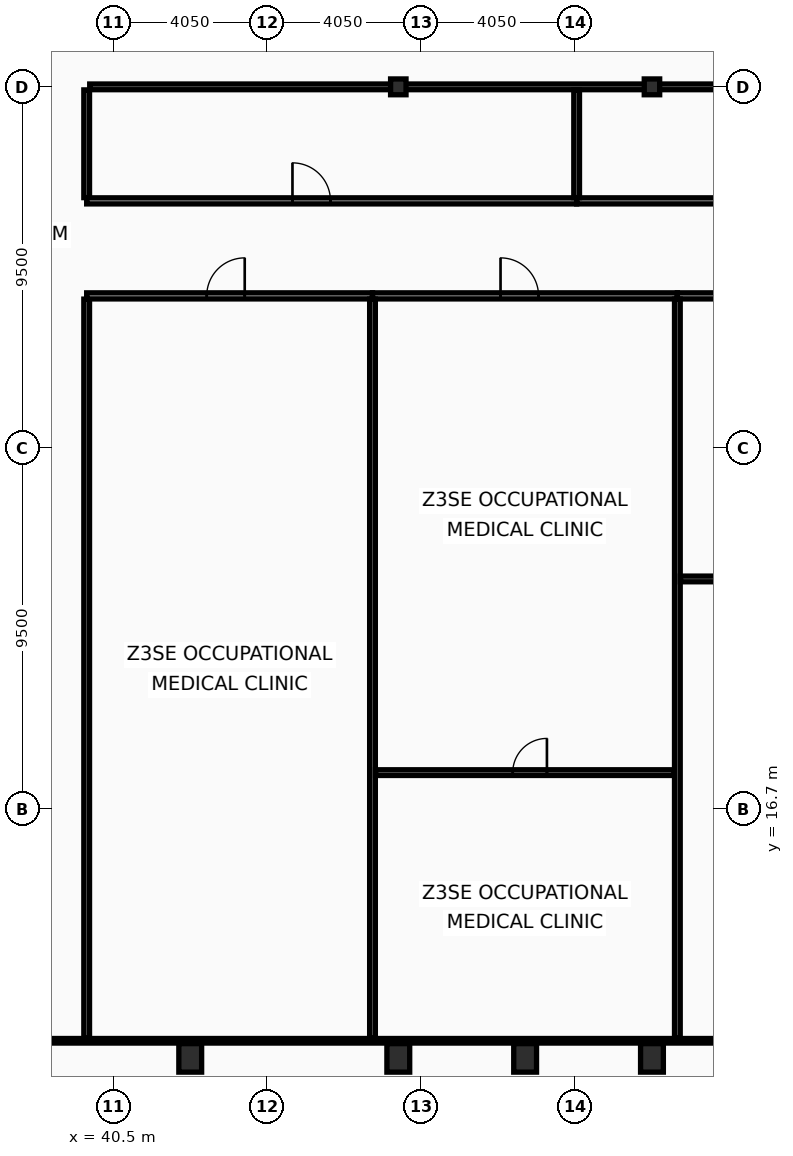
"""IFC4 building model, lengths in metres.
Left out: names, types, materials, properties, quantities, classifications, styles, units other than length and angle.
Written with IfcOpenShell. Run it as: python <this file> out.ifc"""

import sys

from ifc_helpers import new_model, si_unit, direction, frame, frame_2d, origin, origin_2d, place, context, subcontext, project, spatial, rectangle, hollow_rectangle, i_section, extrude, element, fill, save


model = new_model("IFC4")
c1 = context("Model", 3, precision=1e-05, world=origin(), true_north=direction((0.0, 1.0)))
c2 = subcontext(c1, "Body", "Model", "MODEL_VIEW")
j1 = project(units=[si_unit("LENGTHUNIT", "METRE"), si_unit("PLANEANGLEUNIT", "RADIAN")], contexts=[c1])
p1 = place(None, origin())
s1 = spatial("IfcSite", under=j1, at=p1, CompositionType="ELEMENT")
p2 = place(p1, origin())
s2 = spatial("IfcBuilding", under=s1, at=p2, CompositionType="ELEMENT")
p3 = place(p2, frame((0.0, 0.0, 224.6)))
s3 = spatial("IfcBuildingStorey", under=s2, at=p3, CompositionType="ELEMENT", Elevation=224.6)
for number, where, z_axis, x_axis in (
    (1, (42.525, 10.15, 0.0), (0.0, 0.0, 1.0), (1.0, 0.0, 0.0)),
    (2, (48.0, 10.15, 0.0), (0.0, 0.0, 1.0), (1.0, 0.0, 0.0)),
    (3, (51.337, 10.15, 0.0), (0.0, 0.0, 1.0), (1.0, 0.0, 0.0)),
    (4, (54.675, 10.15, 0.0), (0.0, 0.0, 1.0), (1.0, 0.0, 0.0)),
):
    element("IfcColumn", number, at=place(p3, frame(where, z_axis=z_axis, x_axis=x_axis)), inside=s3, PredefinedType="COLUMN", context=c2, shape_type="SweptSolid", body=[
        extrude(hollow_rectangle(XDim=0.6, YDim=0.75, WallThickness=0.045, at=origin_2d()), origin(), (0.0, 0.0, 1.0), 3.6),
    ])
for number, where, z_axis, x_axis in (
    (5, (48.0, 35.7, 0.0), (0.0, 0.0, 1.0), (1.0, 0.0, 0.0)),
    (6, (54.675, 35.7, 0.0), (0.0, 0.0, 1.0), (1.0, 0.0, 0.0)),
):
    element("IfcColumn", number, at=place(p3, frame(where, z_axis=z_axis, x_axis=x_axis)), inside=s3, PredefinedType="COLUMN", context=c2, shape_type="SweptSolid", body=[
        extrude(i_section(OverallWidth=0.406, OverallDepth=0.416, WebThickness=0.03, FlangeThickness=0.048, at=origin_2d()), origin(), (0.0, 0.0, 1.0), 3.6),
    ])
p4 = place(p3, frame((39.8, 10.665, 0.0), z_axis=(0.0, 0.0, 1.0), x_axis=(0.0, 1.0, 0.0)))
e7 = element("IfcWall", 7, at=p4, inside=s3, PredefinedType="PARTITIONING", context=c2, shape_type="SweptSolid", body=[
    extrude(rectangle(XDim=19.45, YDim=0.15, at=frame_2d((9.725, 0.0))), origin(), (0.0, 0.0, 1.0), 2.98),
])
p5 = place(p3, frame((39.8, 32.785, 0.0), z_axis=(0.0, 0.0, 1.0), x_axis=(0.0, 1.0, 0.0)))
e8 = element("IfcWall", 8, at=p5, inside=s3, PredefinedType="PARTITIONING", context=c2, shape_type="SweptSolid", body=[
    extrude(rectangle(XDim=2.835, YDim=0.15, at=frame_2d((1.417, 0.0))), origin(), (0.0, 0.0, 1.0), 2.98),
])
p6 = place(p3, frame((39.88, 35.7, 0.0), z_axis=(0.0, 0.0, 1.0), x_axis=(1.0, 0.0, 0.0)))
e9 = element("IfcWall", 9, at=p6, inside=s3, PredefinedType="PARTITIONING", context=c2, shape_type="SweptSolid", body=[
    extrude(rectangle(XDim=24.925, YDim=0.15, at=frame_2d((12.462, 0.0))), origin(), (0.0, 0.0, 1.0), 2.78),
])
p7 = place(p3, frame((39.8, 30.2, 0.0), z_axis=(0.0, 0.0, 1.0), x_axis=(1.0, 0.0, 0.0)))
e10 = element("IfcWall", 10, at=p7, inside=s3, PredefinedType="PARTITIONING", context=c2, shape_type="SweptSolid", body=[
    extrude(rectangle(XDim=7.521, YDim=0.16, at=frame_2d((3.76, 0.0))), origin(), (0.0, 0.0, 1.0), 2.78),
])
p8 = place(p7, frame((3.159, 0.0, 0.0)))
e11 = element("IfcOpeningElement", 11, at=p8, cuts=e10, PredefinedType="OPENING", context=c2, shape_type="SweptSolid", body=[
    extrude(rectangle(XDim=1.0, YDim=2.05, at=frame_2d((0.5, 1.025))), frame((0.0, 0.09, 0.0), z_axis=(0.0, -1.0, 0.0), x_axis=(1.0, 0.0, 0.0)), (0.0, 0.0, 1.0), 0.18),
])
p9 = place(p3, frame((47.321, 30.2, 0.0), z_axis=(0.0, 0.0, 1.0), x_axis=(1.0, 0.0, 0.0)))
e12 = element("IfcWall", 12, at=p9, inside=s3, PredefinedType="PARTITIONING", context=c2, shape_type="SweptSolid", body=[
    extrude(rectangle(XDim=8.022, YDim=0.16, at=frame_2d((4.011, 0.0))), origin(), (0.0, 0.0, 1.0), 2.78),
])
p10 = place(p9, frame((3.369, 0.0, 0.0)))
e13 = element("IfcOpeningElement", 13, at=p10, cuts=e12, PredefinedType="OPENING", context=c2, shape_type="SweptSolid", body=[
    extrude(rectangle(XDim=1.0, YDim=2.05, at=frame_2d((0.5, 1.025))), frame((0.0, 0.09, 0.0), z_axis=(0.0, -1.0, 0.0), x_axis=(1.0, 0.0, 0.0)), (0.0, 0.0, 1.0), 0.18),
])
p11 = place(p3, frame((47.321, 10.665, 0.0), z_axis=(0.0, 0.0, 1.0), x_axis=(0.0, 1.0, 0.0)))
e14 = element("IfcWall", 14, at=p11, inside=s3, PredefinedType="PARTITIONING", context=c2, shape_type="SweptSolid", body=[
    extrude(rectangle(XDim=19.45, YDim=0.15, at=frame_2d((9.725, 0.0))), origin(), (0.0, 0.0, 1.0), 2.98),
])
p12 = place(p3, frame((47.401, 17.656, 0.0), z_axis=(0.0, 0.0, 1.0), x_axis=(1.0, 0.0, 0.0)))
e15 = element("IfcWall", 15, at=p12, inside=s3, PredefinedType="PARTITIONING", context=c2, shape_type="SweptSolid", body=[
    extrude(rectangle(XDim=7.863, YDim=0.15, at=frame_2d((3.931, 0.0))), origin(), (0.0, 0.0, 1.0), 2.78),
])
p13 = place(p12, frame((3.61, 0.0, 0.0)))
e16 = element("IfcOpeningElement", 16, at=p13, cuts=e15, PredefinedType="OPENING", context=c2, shape_type="SweptSolid", body=[
    extrude(rectangle(XDim=0.9, YDim=2.05, at=frame_2d((0.45, 1.025))), frame((0.0, 0.085, 0.0), z_axis=(0.0, -1.0, 0.0), x_axis=(1.0, 0.0, 0.0)), (0.0, 0.0, 1.0), 0.17),
])
p14 = place(p3, frame((55.344, 30.2, 0.0), z_axis=(0.0, 0.0, 1.0), x_axis=(1.0, 0.0, 0.0)))
e17 = element("IfcWall", 17, at=p14, inside=s3, PredefinedType="PARTITIONING", context=c2, shape_type="SweptSolid", body=[
    extrude(rectangle(XDim=9.527, YDim=0.16, at=frame_2d((4.763, 0.0))), origin(), (0.0, 0.0, 1.0), 3.44),
])
p15 = place(p14, frame((4.001, 0.0, 0.0)))
e18 = element("IfcOpeningElement", 18, at=p15, cuts=e17, PredefinedType="OPENING", context=c2, shape_type="SweptSolid", body=[
    extrude(rectangle(XDim=1.0, YDim=2.05, at=frame_2d((0.5, 1.025))), frame((0.0, 0.09, 0.0), z_axis=(0.0, -1.0, 0.0), x_axis=(1.0, 0.0, 0.0)), (0.0, 0.0, 1.0), 0.18),
])
p16 = place(p3, frame((55.344, 10.665, 0.0), z_axis=(0.0, 0.0, 1.0), x_axis=(0.0, 1.0, 0.0)))
e19 = element("IfcWall", 19, at=p16, inside=s3, PredefinedType="PARTITIONING", context=c2, shape_type="SweptSolid", body=[
    extrude(rectangle(XDim=19.45, YDim=0.15, at=frame_2d((9.725, 0.0))), origin(), (0.0, 0.0, 1.0), 2.78),
])
p17 = place(p3, frame((55.423, 22.752, 0.0), z_axis=(0.0, 0.0, 1.0), x_axis=(1.0, 0.0, 0.0)))
e20 = element("IfcWall", 20, at=p17, inside=s3, PredefinedType="PARTITIONING", context=c2, shape_type="SweptSolid", body=[
    extrude(rectangle(XDim=9.382, YDim=0.15, at=frame_2d((4.691, 0.0))), origin(), (0.0, 0.0, 1.0), 3.44),
])
p18 = place(p17, frame((4.287, 0.0, 0.0)))
e21 = element("IfcOpeningElement", 21, at=p18, cuts=e20, PredefinedType="OPENING", context=c2, shape_type="SweptSolid", body=[
    extrude(rectangle(XDim=0.9, YDim=2.05, at=frame_2d((0.45, 1.025))), frame((0.0, 0.085, 0.0), z_axis=(0.0, -1.0, 0.0), x_axis=(1.0, 0.0, 0.0)), (0.0, 0.0, 1.0), 0.17),
])
p19 = place(p3, frame((39.8, 32.7, 0.0), z_axis=(0.0, 0.0, 1.0), x_axis=(1.0, 0.0, 0.0)))
e22 = element("IfcWall", 22, at=p19, inside=s3, PredefinedType="PARTITIONING", context=c2, shape_type="SweptSolid", body=[
    extrude(rectangle(XDim=12.893, YDim=0.16, at=frame_2d((6.447, 0.0))), origin(), (0.0, 0.0, 1.0), 2.78),
])
p20 = place(p19, frame((5.415, 0.0, 0.0)))
e23 = element("IfcOpeningElement", 23, at=p20, cuts=e22, PredefinedType="OPENING", context=c2, shape_type="SweptSolid", body=[
    extrude(rectangle(XDim=1.0, YDim=2.05, at=frame_2d((0.5, 1.025))), frame((0.0, 0.09, 0.0), z_axis=(0.0, -1.0, 0.0), x_axis=(1.0, 0.0, 0.0)), (0.0, 0.0, 1.0), 0.18),
])
p21 = place(p3, frame((52.693, 32.7, 0.0), z_axis=(0.0, 0.0, 1.0), x_axis=(1.0, 0.0, 0.0)))
e24 = element("IfcWall", 24, at=p21, inside=s3, PredefinedType="PARTITIONING", context=c2, shape_type="SweptSolid", body=[
    extrude(rectangle(XDim=12.177, YDim=0.16, at=frame_2d((6.088, 0.0))), origin(), (0.0, 0.0, 1.0), 2.78),
])
p22 = place(p21, frame((5.114, 0.0, 0.0)))
e25 = element("IfcOpeningElement", 25, at=p22, cuts=e24, PredefinedType="OPENING", context=c2, shape_type="SweptSolid", body=[
    extrude(rectangle(XDim=1.0, YDim=2.05, at=frame_2d((0.5, 1.025))), frame((0.0, 0.09, 0.0), z_axis=(0.0, -1.0, 0.0), x_axis=(1.0, 0.0, 0.0)), (0.0, 0.0, 1.0), 0.18),
])
p23 = place(p3, frame((52.693, 32.785, 0.0), z_axis=(0.0, 0.0, 1.0), x_axis=(0.0, 1.0, 0.0)))
e26 = element("IfcWall", 26, at=p23, inside=s3, PredefinedType="PARTITIONING", context=c2, shape_type="SweptSolid", body=[
    extrude(rectangle(XDim=2.835, YDim=0.15, at=frame_2d((1.417, 0.0))), origin(), (0.0, 0.0, 1.0), 2.98),
])
p24 = place(p3, frame((8.095, 10.6, 0.0), z_axis=(0.0, 0.0, 1.0), x_axis=(1.0, 0.0, 0.0)))
e27 = element("IfcWall", 27, at=p24, inside=s3, PredefinedType="PARTITIONING", context=c2, shape_type="SweptSolid", body=[
    extrude(rectangle(XDim=56.71, YDim=0.12, at=frame_2d((28.355, 0.0))), origin(), (0.0, 0.0, 1.0), 2.78),
])
p25 = place(p8, origin())
e28 = element("IfcDoor", 28, at=p25, inside=s3, OperationType="SINGLE_SWING_RIGHT", PredefinedType="DOOR", context=c2, shape_type="SweptSolid", body=[
    extrude(rectangle(XDim=1.0, YDim=2.05, at=frame_2d((0.5, 1.025))), frame((0.0, 0.025, 0.0), z_axis=(0.0, -1.0, 0.0), x_axis=(1.0, 0.0, 0.0)), (0.0, 0.0, 1.0), 0.05),
])
fill(e11, e28)
p26 = place(p10, origin())
e29 = element("IfcDoor", 29, at=p26, inside=s3, OperationType="SINGLE_SWING_LEFT", PredefinedType="DOOR", context=c2, shape_type="SweptSolid", body=[
    extrude(rectangle(XDim=1.0, YDim=2.05, at=frame_2d((0.5, 1.025))), frame((0.0, 0.025, 0.0), z_axis=(0.0, -1.0, 0.0), x_axis=(1.0, 0.0, 0.0)), (0.0, 0.0, 1.0), 0.05),
])
fill(e13, e29)
p27 = place(p13, origin())
e30 = element("IfcDoor", 30, at=p27, inside=s3, OperationType="SINGLE_SWING_RIGHT", PredefinedType="DOOR", context=c2, shape_type="SweptSolid", body=[
    extrude(rectangle(XDim=0.9, YDim=2.05, at=frame_2d((0.45, 1.025))), frame((0.0, 0.025, 0.0), z_axis=(0.0, -1.0, 0.0), x_axis=(1.0, 0.0, 0.0)), (0.0, 0.0, 1.0), 0.05),
])
fill(e16, e30)
p28 = place(p20, origin())
e31 = element("IfcDoor", 31, at=p28, inside=s3, OperationType="SINGLE_SWING_LEFT", PredefinedType="DOOR", context=c2, shape_type="SweptSolid", body=[
    extrude(rectangle(XDim=1.0, YDim=2.05, at=frame_2d((0.5, 1.025))), frame((0.0, 0.025, 0.0), z_axis=(0.0, -1.0, 0.0), x_axis=(1.0, 0.0, 0.0)), (0.0, 0.0, 1.0), 0.05),
])
fill(e23, e31)
save(model, sys.argv[1])
